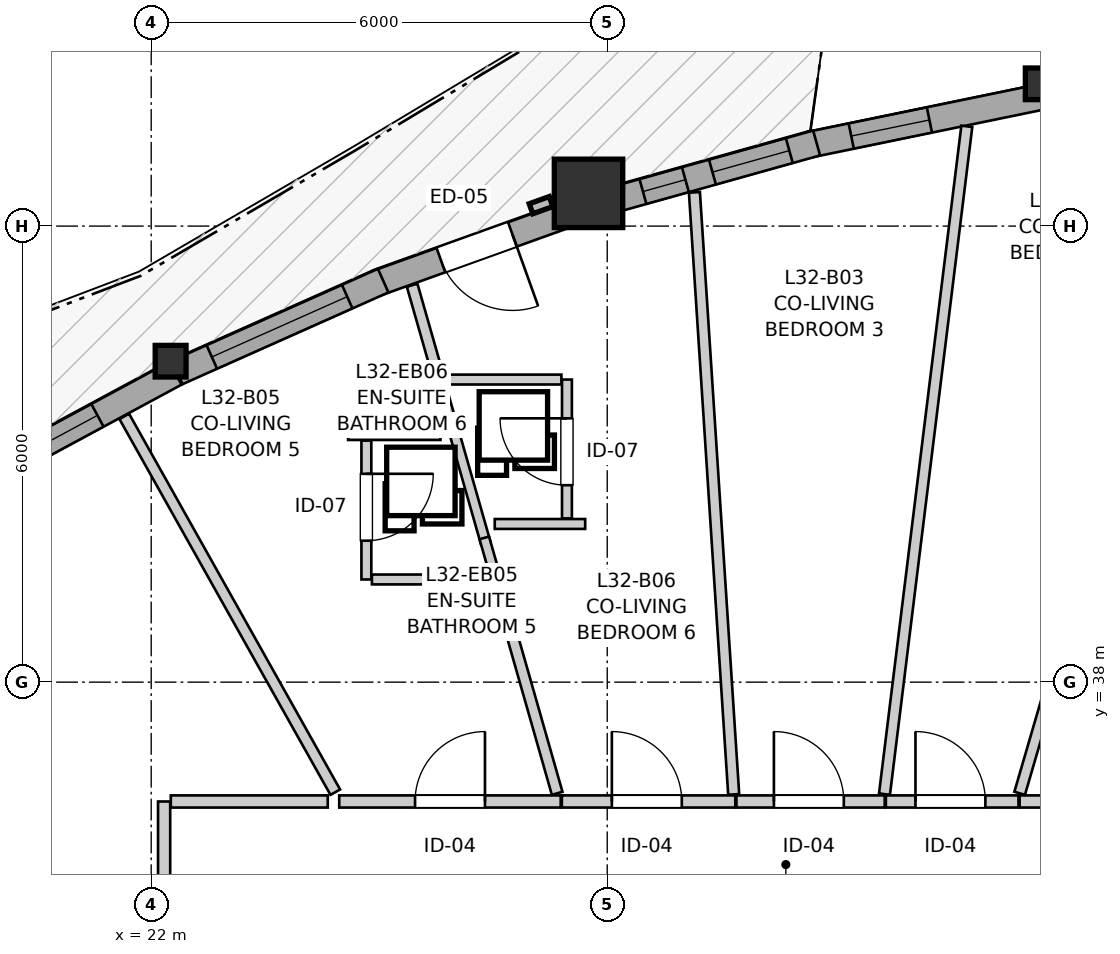
"""IFC4 building model, lengths in metres.
Left out: names, types, materials, properties, quantities, classifications, styles, units other than length and angle.
Written with IfcOpenShell. Run it as: python <this file> out.ifc"""

import sys

from ifc_helpers import new_model, si_unit, direction, frame, frame_2d, origin, origin_2d, place, context, subcontext, project, spatial, rectangle, i_section, extrude, source, transform, mapped, element, fill, save


model = new_model("IFC4")
c1 = context("Model", 3, precision=1e-05, world=origin(), true_north=direction((0.0, 1.0)))
c2 = subcontext(c1, "Body", "Model", "MODEL_VIEW")
j1 = project(units=[si_unit("LENGTHUNIT", "METRE"), si_unit("PLANEANGLEUNIT", "RADIAN")], contexts=[c1])
p1 = place(None, origin())
s1 = spatial("IfcSite", under=j1, at=p1, CompositionType="ELEMENT")
p2 = place(p1, origin())
s2 = spatial("IfcBuilding", under=s1, at=p2, CompositionType="ELEMENT")
p3 = place(p2, frame((0.0, 0.0, 108.8)))
s3 = spatial("IfcBuildingStorey", under=s2, at=p3, CompositionType="ELEMENT", Elevation=108.8)
m1 = source(origin(), c2, "Body", "SweptSolid", [
    extrude(i_section(OverallWidth=0.406, OverallDepth=0.416, WebThickness=0.027, FlangeThickness=0.044, FilletRadius=0.015, at=origin_2d()), origin(), (0.0, 0.0, 1.0), 2.935),
])
p4 = place(p3, frame((33.704, 45.872, 0.0), z_axis=(0.0, 0.0, 1.0), x_axis=(1.0, 0.0, 0.0)))
e1 = element("IfcColumn", 1, at=p4, inside=s3, PredefinedType="PILASTER", context=c2, shape_type="MappedRepresentation", body=[
    mapped(m1, transform((0.0, 0.0, 0.0), x_axis=(1.0, 0.0, 0.0), y_axis=(0.0, 1.0, 0.0), z_axis=(0.0, 0.0, 1.0), scale=1.0)),
])
m2 = source(origin(), c2, "Body", "SweptSolid", [
    extrude(rectangle(XDim=0.9, YDim=0.9, at=origin_2d()), origin(), (0.0, 0.0, 1.0), 2.935),
])
p5 = place(p3, frame((27.754, 44.431, 0.0), z_axis=(0.0, 0.0, 1.0), x_axis=(1.0, 0.0, 0.0)))
e2 = element("IfcColumn", 2, at=p5, inside=s3, PredefinedType="COLUMN", context=c2, shape_type="MappedRepresentation", body=[
    mapped(m2, transform((0.0, 0.0, 0.0), x_axis=(1.0, 0.0, 0.0), y_axis=(0.0, 1.0, 0.0), z_axis=(0.0, 0.0, 1.0), scale=1.0)),
])
p6 = place(p3, frame((22.256, 42.222, 0.0), z_axis=(0.0, 0.0, 1.0), x_axis=(1.0, 0.0, 0.0)))
e3 = element("IfcColumn", 3, at=p6, inside=s3, PredefinedType="PILASTER", context=c2, shape_type="MappedRepresentation", body=[
    mapped(m1, transform((0.0, 0.0, 0.0), x_axis=(1.0, 0.0, 0.0), y_axis=(0.0, 1.0, 0.0), z_axis=(0.0, 0.0, 1.0), scale=1.0)),
])
p7 = place(p3, frame((33.719, 45.701, 0.0), z_axis=(0.0, 0.0, 1.0), x_axis=(-0.979417849231, -0.201843198072, 0.0)))
e4 = element("IfcWall", 4, at=p7, inside=s3, PredefinedType="SOLIDWALL", context=c2, shape_type="SweptSolid", body=[
    extrude(rectangle(XDim=3.113, YDim=0.34, at=frame_2d((1.557, 0.0))), origin(), (0.0, 0.0, 1.0), 2.465),
])
p8 = place(p7, frame((1.511, 0.0, 0.82)))
e5 = element("IfcOpeningElement", 5, at=p8, cuts=e4, PredefinedType="OPENING", context=c2, shape_type="SweptSolid", body=[
    extrude(rectangle(XDim=1.05, YDim=1.45, at=frame_2d((0.525, 0.725))), frame((0.0, 0.18, 0.0), z_axis=(0.0, -1.0, 0.0), x_axis=(1.0, 0.0, 0.0)), (0.0, 0.0, 1.0), 0.36),
])
p9 = place(p3, frame((30.755, 45.094, 0.0), z_axis=(0.0, 0.0, 1.0), x_axis=(-0.963040794714, -0.269355578589, 0.0)))
e6 = element("IfcWall", 6, at=p9, inside=s3, PredefinedType="SOLIDWALL", context=c2, shape_type="SweptSolid", body=[
    extrude(rectangle(XDim=2.839, YDim=0.34, at=frame_2d((1.419, 0.0))), origin(), (0.0, 0.0, 1.0), 2.465),
])
p10 = place(p9, frame((0.373, 0.0, 0.82)))
e7 = element("IfcOpeningElement", 7, at=p10, cuts=e6, PredefinedType="OPENING", context=c2, shape_type="SweptSolid", body=[
    extrude(rectangle(XDim=1.05, YDim=1.45, at=frame_2d((0.525, 0.725))), frame((0.0, 0.18, 0.0), z_axis=(0.0, -1.0, 0.0), x_axis=(1.0, 0.0, 0.0)), (0.0, 0.0, 1.0), 0.36),
])
p11 = place(p9, frame((1.792, 0.0, 0.82)))
e8 = element("IfcOpeningElement", 8, at=p11, cuts=e6, PredefinedType="OPENING", context=c2, shape_type="SweptSolid", body=[
    extrude(rectangle(XDim=0.58, YDim=1.35, at=frame_2d((0.29, 0.675))), frame((0.0, 0.18, 0.0), z_axis=(0.0, -1.0, 0.0), x_axis=(1.0, 0.0, 0.0)), (0.0, 0.0, 1.0), 0.36),
])
p12 = place(p3, frame((27.595, 44.193, 0.0), z_axis=(0.0, 0.0, 1.0), x_axis=(-0.94107471628, -0.338198726163, 0.0)))
e9 = element("IfcWall", 9, at=p12, inside=s3, PredefinedType="SOLIDWALL", context=c2, shape_type="SweptSolid", body=[
    extrude(rectangle(XDim=2.789, YDim=0.34, at=frame_2d((1.395, 0.0))), origin(), (0.0, 0.0, 1.0), 2.465),
])
p13 = place(p12, frame((0.895, 0.0, 0.0)))
e10 = element("IfcOpeningElement", 10, at=p13, cuts=e9, PredefinedType="OPENING", context=c2, shape_type="SweptSolid", body=[
    extrude(rectangle(XDim=1.0, YDim=2.1, at=frame_2d((0.5, 1.05))), frame((0.0, 0.18, 0.0), z_axis=(0.0, -1.0, 0.0), x_axis=(1.0, 0.0, 0.0)), (0.0, 0.0, 1.0), 0.36),
])
p14 = place(p3, frame((25.052, 43.283, 0.0), z_axis=(0.0, 0.0, 1.0), x_axis=(-0.913400340023, -0.407062426227, 0.0)))
e11 = element("IfcWall", 11, at=p14, inside=s3, PredefinedType="SOLIDWALL", context=c2, shape_type="SweptSolid", body=[
    extrude(rectangle(XDim=2.966, YDim=0.34, at=frame_2d((1.483, 0.0))), origin(), (0.0, 0.0, 1.0), 2.465),
])
p15 = place(p14, frame((0.518, 0.0, 0.82)))
e12 = element("IfcOpeningElement", 12, at=p15, cuts=e11, PredefinedType="OPENING", context=c2, shape_type="SweptSolid", body=[
    extrude(rectangle(XDim=1.95, YDim=1.4, at=frame_2d((0.975, 0.7))), frame((0.0, 0.18, 0.0), z_axis=(0.0, -1.0, 0.0), x_axis=(1.0, 0.0, 0.0)), (0.0, 0.0, 1.0), 0.36),
])
p16 = place(p3, frame((22.319, 42.063, 0.0), z_axis=(0.0, 0.0, 1.0), x_axis=(-0.880050731383, -0.4748796797, 0.0)))
e13 = element("IfcWall", 13, at=p16, inside=s3, PredefinedType="SOLIDWALL", context=c2, shape_type="SweptSolid", body=[
    extrude(rectangle(XDim=2.949, YDim=0.34, at=frame_2d((1.475, 0.0))), origin(), (0.0, 0.0, 1.0), 2.465),
])
p17 = place(p16, frame((1.166, 0.0, 0.82)))
e14 = element("IfcOpeningElement", 14, at=p17, cuts=e13, PredefinedType="OPENING", context=c2, shape_type="SweptSolid", body=[
    extrude(rectangle(XDim=1.4, YDim=1.35, at=frame_2d((0.7, 0.675))), frame((0.0, 0.18, 0.0), z_axis=(0.0, -1.0, 0.0), x_axis=(1.0, 0.0, 0.0)), (0.0, 0.0, 1.0), 0.36),
])
p18 = place(p3, frame((22.17, 29.865, 0.0), z_axis=(0.0, 0.0, 1.0), x_axis=(0.0, 1.0, 0.0)))
e15 = element("IfcWall", 15, at=p18, inside=s3, PredefinedType="PARTITIONING", context=c2, shape_type="SweptSolid", body=[
    extrude(rectangle(XDim=6.565, YDim=0.16, at=frame_2d((3.282, 0.0))), origin(), (0.0, 0.0, 1.0), 2.935),
])
p19 = place(p18, frame((2.811, 0.0, 0.0)))
e16 = element("IfcOpeningElement", 16, at=p19, cuts=e15, PredefinedType="OPENING", context=c2, shape_type="SweptSolid", body=[
    extrude(rectangle(XDim=0.96, YDim=2.1, at=frame_2d((0.48, 1.05))), frame((0.0, 0.09, 0.0), z_axis=(0.0, -1.0, 0.0), x_axis=(1.0, 0.0, 0.0)), (0.0, 0.0, 1.0), 0.18),
])
p20 = place(p3, frame((24.474, 36.43, 0.0), z_axis=(0.0, 0.0, 1.0), x_axis=(1.0, 0.0, 0.0)))
e17 = element("IfcWall", 17, at=p20, inside=s3, PredefinedType="PARTITIONING", context=c2, shape_type="SweptSolid", body=[
    extrude(rectangle(XDim=2.914, YDim=0.16, at=frame_2d((1.457, 0.0))), origin(), (0.0, 0.0, 1.0), 2.573),
])
p21 = place(p20, frame((0.998, 0.0, 0.0)))
e18 = element("IfcOpeningElement", 18, at=p21, cuts=e17, PredefinedType="OPENING", context=c2, shape_type="SweptSolid", body=[
    extrude(rectangle(XDim=0.92, YDim=2.1, at=frame_2d((0.46, 1.05))), frame((0.0, 0.09, 0.0), z_axis=(0.0, -1.0, 0.0), x_axis=(1.0, 0.0, 0.0)), (0.0, 0.0, 1.0), 0.18),
])
p22 = place(p3, frame((27.403, 36.43, 0.0), z_axis=(0.0, 0.0, 1.0), x_axis=(1.0, 0.0, 0.0)))
e19 = element("IfcWall", 19, at=p22, inside=s3, PredefinedType="PARTITIONING", context=c2, shape_type="SweptSolid", body=[
    extrude(rectangle(XDim=2.282, YDim=0.16, at=frame_2d((1.141, 0.0))), origin(), (0.0, 0.0, 1.0), 2.935),
])
p23 = place(p22, frame((0.658, 0.0, 0.0)))
e20 = element("IfcOpeningElement", 20, at=p23, cuts=e19, PredefinedType="OPENING", context=c2, shape_type="SweptSolid", body=[
    extrude(rectangle(XDim=0.92, YDim=2.1, at=frame_2d((0.46, 1.05))), frame((0.0, 0.09, 0.0), z_axis=(0.0, -1.0, 0.0), x_axis=(1.0, 0.0, 0.0)), (0.0, 0.0, 1.0), 0.18),
])
p24 = place(p3, frame((29.7, 36.43, 0.0), z_axis=(0.0, 0.0, 1.0), x_axis=(1.0, 0.0, 0.0)))
e21 = element("IfcWall", 21, at=p24, inside=s3, PredefinedType="PARTITIONING", context=c2, shape_type="SweptSolid", body=[
    extrude(rectangle(XDim=1.951, YDim=0.16, at=frame_2d((0.976, 0.0))), origin(), (0.0, 0.0, 1.0), 2.935),
])
p25 = place(p24, frame((0.493, 0.0, 0.0)))
e22 = element("IfcOpeningElement", 22, at=p25, cuts=e21, PredefinedType="OPENING", context=c2, shape_type="SweptSolid", body=[
    extrude(rectangle(XDim=0.92, YDim=2.1, at=frame_2d((0.46, 1.05))), frame((0.0, 0.09, 0.0), z_axis=(0.0, -1.0, 0.0), x_axis=(1.0, 0.0, 0.0)), (0.0, 0.0, 1.0), 0.18),
])
p26 = place(p3, frame((24.831, 41.178, 0.0), z_axis=(0.0, 0.0, 1.0), x_axis=(0.0, -1.0, 0.0)))
e23 = element("IfcWall", 23, at=p26, inside=s3, PredefinedType="PARTITIONING", context=c2, shape_type="SweptSolid", body=[
    extrude(rectangle(XDim=1.827, YDim=0.13, at=frame_2d((0.914, 0.0))), origin(), (0.0, 0.0, 1.0), 2.935),
])
p27 = place(p26, frame((0.437, 0.0, 0.0)))
e24 = element("IfcOpeningElement", 24, at=p27, cuts=e23, PredefinedType="OPENING", context=c2, shape_type="SweptSolid", body=[
    extrude(rectangle(XDim=0.88, YDim=2.05, at=frame_2d((0.44, 1.025))), frame((0.0, 0.075, 0.0), z_axis=(0.0, -1.0, 0.0), x_axis=(1.0, 0.0, 0.0)), (0.0, 0.0, 1.0), 0.15),
])
p28 = place(p3, frame((27.47, 40.154, 0.0), z_axis=(0.0, 0.0, 1.0), x_axis=(0.0, 1.0, 0.0)))
e25 = element("IfcWall", 25, at=p28, inside=s3, PredefinedType="PARTITIONING", context=c2, shape_type="SweptSolid", body=[
    extrude(rectangle(XDim=1.827, YDim=0.13, at=frame_2d((0.914, 0.0))), origin(), (0.0, 0.0, 1.0), 2.935),
])
p29 = place(p28, frame((0.437, 0.0, 0.0)))
e26 = element("IfcOpeningElement", 26, at=p29, cuts=e25, PredefinedType="OPENING", context=c2, shape_type="SweptSolid", body=[
    extrude(rectangle(XDim=0.88, YDim=2.05, at=frame_2d((0.44, 1.025))), frame((0.0, 0.075, 0.0), z_axis=(0.0, -1.0, 0.0), x_axis=(1.0, 0.0, 0.0)), (0.0, 0.0, 1.0), 0.15),
])
p30 = place(p3, frame((31.666, 36.43, 0.0), z_axis=(0.0, 0.0, 1.0), x_axis=(1.0, 0.0, 0.0)))
e27 = element("IfcWall", 27, at=p30, inside=s3, PredefinedType="PARTITIONING", context=c2, shape_type="SweptSolid", body=[
    extrude(rectangle(XDim=1.745, YDim=0.16, at=frame_2d((0.873, 0.0))), origin(), (0.0, 0.0, 1.0), 2.935),
])
p31 = place(p30, frame((0.389, 0.0, 0.0)))
e28 = element("IfcOpeningElement", 28, at=p31, cuts=e27, PredefinedType="OPENING", context=c2, shape_type="SweptSolid", body=[
    extrude(rectangle(XDim=0.92, YDim=2.1, at=frame_2d((0.46, 1.05))), frame((0.0, 0.09, 0.0), z_axis=(0.0, -1.0, 0.0), x_axis=(1.0, 0.0, 0.0)), (0.0, 0.0, 1.0), 0.18),
])
p32 = place(p3, frame((33.426, 36.43, 0.0), z_axis=(0.0, 0.0, 1.0), x_axis=(1.0, 0.0, 0.0)))
e29 = element("IfcWall", 29, at=p32, inside=s3, PredefinedType="PARTITIONING", context=c2, shape_type="SweptSolid", body=[
    extrude(rectangle(XDim=1.68, YDim=0.16, at=frame_2d((0.84, 0.0))), origin(), (0.0, 0.0, 1.0), 2.935),
])
p33 = place(p32, frame((0.38, 0.0, 0.0)))
e30 = element("IfcOpeningElement", 30, at=p33, cuts=e29, PredefinedType="OPENING", context=c2, shape_type="SweptSolid", body=[
    extrude(rectangle(XDim=0.92, YDim=2.1, at=frame_2d((0.46, 1.05))), frame((0.0, 0.09, 0.0), z_axis=(0.0, -1.0, 0.0), x_axis=(1.0, 0.0, 0.0)), (0.0, 0.0, 1.0), 0.18),
])
p34 = place(p3, frame((33.427, 36.538, 0.0), z_axis=(0.0, 0.0, 1.0), x_axis=(0.280326379037, 0.959904745908, 0.0)))
e31 = element("IfcWall", 31, at=p34, inside=s3, PredefinedType="PARTITIONING", context=c2, shape_type="SweptSolid", body=[
    extrude(rectangle(XDim=10.082, YDim=0.145, at=frame_2d((5.041, 0.0))), origin(), (0.0, 0.0, 1.0), 2.935),
])
p35 = place(p3, frame((31.648, 36.527, 0.0), z_axis=(0.0, 0.0, 1.0), x_axis=(0.122371290087, 0.992484391496, 0.0)))
e32 = element("IfcWall", 32, at=p35, inside=s3, PredefinedType="PARTITIONING", context=c2, shape_type="SweptSolid", body=[
    extrude(rectangle(XDim=8.852, YDim=0.145, at=frame_2d((4.426, 0.0))), origin(), (0.0, 0.0, 1.0), 2.935),
])
p36 = place(p3, frame((29.147, 44.444, 0.0), z_axis=(0.0, 0.0, 1.0), x_axis=(0.065112427166, -0.997877934333, 0.0)))
e33 = element("IfcWall", 33, at=p36, inside=s3, PredefinedType="PARTITIONING", context=c2, shape_type="SweptSolid", body=[
    extrude(rectangle(XDim=7.938, YDim=0.145, at=frame_2d((3.969, 0.0))), origin(), (0.0, 0.0, 1.0), 2.935),
])
p37 = place(p3, frame((21.645, 41.497, 0.0), z_axis=(0.0, 0.0, 1.0), x_axis=(0.489699005063, -0.871891555436, 0.0)))
e34 = element("IfcWall", 34, at=p37, inside=s3, PredefinedType="PARTITIONING", context=c2, shape_type="SweptSolid", body=[
    extrude(rectangle(XDim=5.671, YDim=0.145, at=frame_2d((2.835, 0.0))), origin(), (0.0, 0.0, 1.0), 2.935),
])
p38 = place(p3, frame((26.539, 39.351, 0.0), z_axis=(0.0, 0.0, 1.0), x_axis=(0.274214096408, -0.961668669205, 0.0)))
e35 = element("IfcWall", 35, at=p38, inside=s3, PredefinedType="PARTITIONING", context=c2, shape_type="SweptSolid", body=[
    extrude(rectangle(XDim=2.926, YDim=0.145, at=frame_2d((1.463, 0.0))), origin(), (0.0, 0.0, 1.0), 2.935),
])
p39 = place(p3, frame((22.258, 36.43, 0.0), z_axis=(0.0, 0.0, 1.0), x_axis=(1.0, 0.0, 0.0)))
e36 = element("IfcWall", 36, at=p39, inside=s3, PredefinedType="PARTITIONING", context=c2, shape_type="SweptSolid", body=[
    extrude(rectangle(XDim=2.065, YDim=0.16, at=frame_2d((1.032, 0.0))), origin(), (0.0, 0.0, 1.0), 2.935),
])
p40 = place(p3, frame((24.904, 39.351, 0.0), z_axis=(0.0, 0.0, 1.0), x_axis=(1.0, 0.0, 0.0)))
e37 = element("IfcWall", 37, at=p40, inside=s3, PredefinedType="PARTITIONING", context=c2, shape_type="SweptSolid", body=[
    extrude(rectangle(XDim=1.533, YDim=0.13, at=frame_2d((0.767, 0.0))), origin(), (0.0, 0.0, 1.0), 2.935),
])
p41 = place(p3, frame((25.882, 41.981, 0.0), z_axis=(0.0, 0.0, 1.0), x_axis=(1.0, 0.0, 0.0)))
e38 = element("IfcWall", 38, at=p41, inside=s3, PredefinedType="PARTITIONING", context=c2, shape_type="SweptSolid", body=[
    extrude(rectangle(XDim=1.515, YDim=0.13, at=frame_2d((0.757, 0.0))), origin(), (0.0, 0.0, 1.0), 2.935),
])
p42 = place(p3, frame((25.433, 43.222, 0.0), z_axis=(0.0, 0.0, 1.0), x_axis=(0.274641170969, -0.961546788882, 0.0)))
e39 = element("IfcWall", 39, at=p42, inside=s3, PredefinedType="PARTITIONING", context=c2, shape_type="SweptSolid", body=[
    extrude(rectangle(XDim=1.21, YDim=0.145, at=frame_2d((0.605, 0.0))), origin(), (0.0, 0.0, 1.0), 2.935),
])
p43 = place(p3, frame((25.93, 41.482, 0.0), z_axis=(0.0, 0.0, 1.0), x_axis=(0.274344452215, -0.961631489469, 0.0)))
e40 = element("IfcWall", 40, at=p43, inside=s3, PredefinedType="PARTITIONING", context=c2, shape_type="SweptSolid", body=[
    extrude(rectangle(XDim=1.712, YDim=0.13, at=frame_2d((0.856, 0.0))), origin(), (0.0, 0.0, 1.0), 2.935),
])
p44 = place(p3, frame((24.591, 41.251, 0.0), z_axis=(0.0, 0.0, 1.0), x_axis=(1.0, 0.0, 0.0)))
e41 = element("IfcWall", 41, at=p44, inside=s3, PredefinedType="PARTITIONING", context=c2, shape_type="SweptSolid", body=[
    extrude(rectangle(XDim=1.215, YDim=0.13, at=frame_2d((0.607, 0.0))), origin(), (0.0, 0.0, 1.0), 2.935),
])
p45 = place(p3, frame((26.52, 40.081, 0.0), z_axis=(0.0, 0.0, 1.0), x_axis=(1.0, 0.0, 0.0)))
e42 = element("IfcWall", 42, at=p45, inside=s3, PredefinedType="PARTITIONING", context=c2, shape_type="SweptSolid", body=[
    extrude(rectangle(XDim=1.19, YDim=0.13, at=frame_2d((0.595, 0.0))), origin(), (0.0, 0.0, 1.0), 2.935),
])
p46 = place(p3, frame((26.383, 39.898, 0.0), z_axis=(0.0, 0.0, 1.0), x_axis=(0.274982401426, -0.961449259663, 0.0)))
e43 = element("IfcWall", 43, at=p46, inside=s3, PredefinedType="PARTITIONING", context=c2, shape_type="SweptSolid", body=[
    extrude(rectangle(XDim=0.617, YDim=0.13, at=frame_2d((0.309, 0.0))), origin(), (0.0, 0.0, 1.0), 2.935),
])
p47 = place(p3, frame((25.755, 42.099, 0.0), z_axis=(0.0, 0.0, 1.0), x_axis=(0.273881956808, -0.961763314821, 0.0)))
e44 = element("IfcWall", 44, at=p47, inside=s3, PredefinedType="PARTITIONING", context=c2, shape_type="SweptSolid", body=[
    extrude(rectangle(XDim=0.692, YDim=0.13, at=frame_2d((0.346, 0.0))), origin(), (0.0, 0.0, 1.0), 2.935),
])
m3 = source(origin(), c2, "Body", "SweptSolid", [
    extrude(rectangle(XDim=1.05, YDim=1.45, at=frame_2d((0.525, 0.725))), frame((0.0, 0.03, 0.0), z_axis=(0.0, -1.0, 0.0), x_axis=(1.0, 0.0, 0.0)), (0.0, 0.0, 1.0), 0.06),
])
p48 = place(p8, origin())
e45 = element("IfcWindow", 45, at=p48, inside=s3, PartitioningType="SINGLE_PANEL", PredefinedType="WINDOW", context=c2, shape_type="MappedRepresentation", body=[
    mapped(m3, transform((0.0, 0.0, 0.0), x_axis=(1.0, 0.0, 0.0), y_axis=(0.0, 1.0, 0.0), z_axis=(0.0, 0.0, 1.0), scale=1.0)),
])
fill(e5, e45)
p49 = place(p10, origin())
e46 = element("IfcWindow", 46, at=p49, inside=s3, PartitioningType="SINGLE_PANEL", PredefinedType="WINDOW", context=c2, shape_type="MappedRepresentation", body=[
    mapped(m3, transform((0.0, 0.0, 0.0), x_axis=(1.0, 0.0, 0.0), y_axis=(0.0, 1.0, 0.0), z_axis=(0.0, 0.0, 1.0), scale=1.0)),
])
fill(e7, e46)
m4 = source(origin(), c2, "Body", "SweptSolid", [
    extrude(rectangle(XDim=0.58, YDim=1.35, at=frame_2d((0.29, 0.675))), frame((0.0, 0.03, 0.0), z_axis=(0.0, -1.0, 0.0), x_axis=(1.0, 0.0, 0.0)), (0.0, 0.0, 1.0), 0.06),
])
p50 = place(p11, origin())
e47 = element("IfcWindow", 47, at=p50, inside=s3, PartitioningType="SINGLE_PANEL", PredefinedType="WINDOW", context=c2, shape_type="MappedRepresentation", body=[
    mapped(m4, transform((0.0, 0.0, 0.0), x_axis=(1.0, 0.0, 0.0), y_axis=(0.0, 1.0, 0.0), z_axis=(0.0, 0.0, 1.0), scale=1.0)),
])
fill(e8, e47)
m5 = source(origin(), c2, "Body", "SweptSolid", [
    extrude(rectangle(XDim=1.95, YDim=1.4, at=frame_2d((0.975, 0.7))), frame((0.0, 0.03, 0.0), z_axis=(0.0, -1.0, 0.0), x_axis=(1.0, 0.0, 0.0)), (0.0, 0.0, 1.0), 0.06),
])
p51 = place(p15, origin())
e48 = element("IfcWindow", 48, at=p51, inside=s3, PartitioningType="SINGLE_PANEL", PredefinedType="WINDOW", context=c2, shape_type="MappedRepresentation", body=[
    mapped(m5, transform((0.0, 0.0, 0.0), x_axis=(1.0, 0.0, 0.0), y_axis=(0.0, 1.0, 0.0), z_axis=(0.0, 0.0, 1.0), scale=1.0)),
])
fill(e12, e48)
m6 = source(origin(), c2, "Body", "SweptSolid", [
    extrude(rectangle(XDim=1.4, YDim=1.35, at=frame_2d((0.7, 0.675))), frame((0.0, 0.03, 0.0), z_axis=(0.0, -1.0, 0.0), x_axis=(1.0, 0.0, 0.0)), (0.0, 0.0, 1.0), 0.06),
])
p52 = place(p17, origin())
e49 = element("IfcWindow", 49, at=p52, inside=s3, PartitioningType="SINGLE_PANEL", PredefinedType="WINDOW", context=c2, shape_type="MappedRepresentation", body=[
    mapped(m6, transform((0.0, 0.0, 0.0), x_axis=(1.0, 0.0, 0.0), y_axis=(0.0, 1.0, 0.0), z_axis=(0.0, 0.0, 1.0), scale=1.0)),
])
fill(e14, e49)
m7 = source(origin(), c2, "Body", "SweptSolid", [
    extrude(rectangle(XDim=1.0, YDim=2.1, at=frame_2d((0.5, 1.05))), frame((0.0, 0.025, 0.0), z_axis=(0.0, -1.0, 0.0), x_axis=(1.0, 0.0, 0.0)), (0.0, 0.0, 1.0), 0.05),
])
p53 = place(p13, origin())
e50 = element("IfcDoor", 50, at=p53, inside=s3, OperationType="SINGLE_SWING_LEFT", PredefinedType="DOOR", context=c2, shape_type="MappedRepresentation", body=[
    mapped(m7, transform((0.0, 0.0, 0.0), x_axis=(1.0, 0.0, 0.0), y_axis=(0.0, 1.0, 0.0), z_axis=(0.0, 0.0, 1.0), scale=1.0)),
])
fill(e10, e50)
m8 = source(origin(), c2, "Body", "SweptSolid", [
    extrude(rectangle(XDim=0.92, YDim=2.1, at=frame_2d((0.46, 1.05))), frame((0.0, 0.025, 0.0), z_axis=(0.0, -1.0, 0.0), x_axis=(1.0, 0.0, 0.0)), (0.0, 0.0, 1.0), 0.05),
])
p54 = place(p21, origin())
e51 = element("IfcDoor", 51, at=p54, inside=s3, OperationType="SINGLE_SWING_RIGHT", PredefinedType="DOOR", context=c2, shape_type="MappedRepresentation", body=[
    mapped(m8, transform((0.0, 0.0, 0.0), x_axis=(1.0, 0.0, 0.0), y_axis=(0.0, 1.0, 0.0), z_axis=(0.0, 0.0, 1.0), scale=1.0)),
])
fill(e18, e51)
p55 = place(p23, origin())
e52 = element("IfcDoor", 52, at=p55, inside=s3, OperationType="SINGLE_SWING_LEFT", PredefinedType="DOOR", context=c2, shape_type="MappedRepresentation", body=[
    mapped(m8, transform((0.0, 0.0, 0.0), x_axis=(1.0, 0.0, 0.0), y_axis=(0.0, 1.0, 0.0), z_axis=(0.0, 0.0, 1.0), scale=1.0)),
])
fill(e20, e52)
p56 = place(p25, origin())
e53 = element("IfcDoor", 53, at=p56, inside=s3, OperationType="SINGLE_SWING_LEFT", PredefinedType="DOOR", context=c2, shape_type="MappedRepresentation", body=[
    mapped(m8, transform((0.0, 0.0, 0.0), x_axis=(1.0, 0.0, 0.0), y_axis=(0.0, 1.0, 0.0), z_axis=(0.0, 0.0, 1.0), scale=1.0)),
])
fill(e22, e53)
m9 = source(origin(), c2, "Body", "SweptSolid", [
    extrude(rectangle(XDim=0.88, YDim=2.05, at=frame_2d((0.44, 1.025))), frame((0.0, 0.025, 0.0), z_axis=(0.0, -1.0, 0.0), x_axis=(1.0, 0.0, 0.0)), (0.0, 0.0, 1.0), 0.05),
])
p57 = place(p27, origin())
e54 = element("IfcDoor", 54, at=p57, inside=s3, OperationType="SINGLE_SWING_LEFT", PredefinedType="DOOR", context=c2, shape_type="MappedRepresentation", body=[
    mapped(m9, transform((0.0, 0.0, 0.0), x_axis=(1.0, 0.0, 0.0), y_axis=(0.0, 1.0, 0.0), z_axis=(0.0, 0.0, 1.0), scale=1.0)),
])
fill(e24, e54)
p58 = place(p29, origin())
e55 = element("IfcDoor", 55, at=p58, inside=s3, OperationType="SINGLE_SWING_RIGHT", PredefinedType="DOOR", context=c2, shape_type="MappedRepresentation", body=[
    mapped(m9, transform((0.0, 0.0, 0.0), x_axis=(1.0, 0.0, 0.0), y_axis=(0.0, 1.0, 0.0), z_axis=(0.0, 0.0, 1.0), scale=1.0)),
])
fill(e26, e55)
p59 = place(p31, origin())
e56 = element("IfcDoor", 56, at=p59, inside=s3, OperationType="SINGLE_SWING_LEFT", PredefinedType="DOOR", context=c2, shape_type="MappedRepresentation", body=[
    mapped(m8, transform((0.0, 0.0, 0.0), x_axis=(1.0, 0.0, 0.0), y_axis=(0.0, 1.0, 0.0), z_axis=(0.0, 0.0, 1.0), scale=1.0)),
])
fill(e28, e56)
save(model, sys.argv[1])
